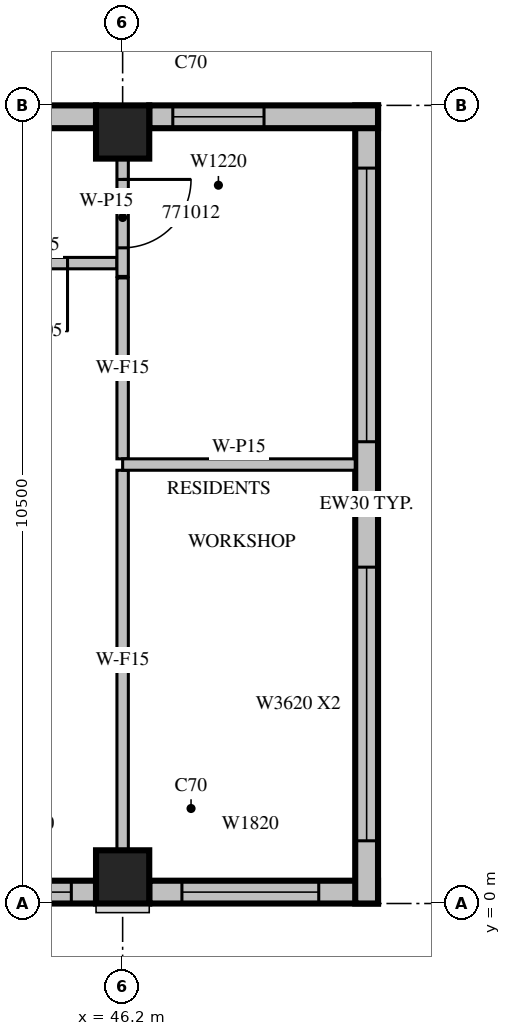
"""IFC4 building model, lengths in metres.
Left out: names, types, materials, properties, quantities, classifications, styles, units other than length and angle.
Written with IfcOpenShell. Run it as: python <this file> out.ifc"""

import sys

from ifc_helpers import new_model, si_unit, direction, frame, frame_2d, origin, origin_2d, place, context, subcontext, project, spatial, rectangle, extrude, source, transform, mapped, element, fill, save


model = new_model("IFC4")
c1 = context("Model", 3, precision=1e-05, world=origin(), true_north=direction((0.0, 1.0)))
c2 = subcontext(c1, "Body", "Model", "MODEL_VIEW")
j1 = project(units=[si_unit("LENGTHUNIT", "METRE"), si_unit("PLANEANGLEUNIT", "RADIAN")], contexts=[c1])
p1 = place(None, origin())
s1 = spatial("IfcSite", under=j1, at=p1, CompositionType="ELEMENT")
p2 = place(p1, origin())
s2 = spatial("IfcBuilding", under=s1, at=p2, CompositionType="ELEMENT")
p3 = place(p2, frame((0.0, 0.0, 309.0)))
s3 = spatial("IfcBuildingStorey", under=s2, at=p3, CompositionType="ELEMENT", Elevation=309.0)
m1 = source(origin(), c2, "Body", "SweptSolid", [
    extrude(rectangle(XDim=0.7, YDim=0.7, at=origin_2d()), origin(), (0.0, 0.0, 1.0), 3.5),
])
for number, where, z_axis, x_axis in (
    (1, (46.2, 0.35, 0.0), (0.0, 0.0, 1.0), (1.0, 0.0, 0.0)),
    (2, (46.2, 10.15, 0.0), (0.0, 0.0, 1.0), (1.0, 0.0, 0.0)),
):
    element("IfcColumn", number, at=place(p3, frame(where, z_axis=z_axis, x_axis=x_axis)), inside=s3, PredefinedType="COLUMN", context=c2, shape_type="MappedRepresentation", body=[
        mapped(m1, transform((0.0, 0.0, 0.0), scale=1.0)),
    ])
m2 = source(origin(), c2, "Body", "SweptSolid", [
    extrude(rectangle(XDim=1.85, YDim=0.3, at=frame_2d((0.925, 0.0))), origin(), (0.0, 0.0, 1.0), 3.1),
])
p4 = place(p3, frame((44.0, 0.15, 0.0), z_axis=(0.0, 0.0, 1.0), x_axis=(1.0, 0.0, 0.0)))
e3 = element("IfcWall", 3, at=p4, inside=s3, PredefinedType="STANDARD", context=c2, shape_type="MappedRepresentation", body=[
    mapped(m2, transform((0.0, 0.0, 0.0), scale=1.0)),
])
m3 = source(origin(), c2, "Body", "SweptSolid", [
    extrude(rectangle(XDim=1.2, YDim=2.0, at=frame_2d((0.6, 1.0))), frame((0.0, 0.16, 0.0), z_axis=(0.0, -1.0, 0.0), x_axis=(1.0, 0.0, 0.0)), (0.0, 0.0, 1.0), 0.32),
])
p5 = place(p4, frame((0.325, 0.0, 0.6)))
e4 = element("IfcOpeningElement", 4, at=p5, cuts=e3, PredefinedType="OPENING", context=c2, shape_type="MappedRepresentation", body=[
    mapped(m3, transform((0.0, 0.0, 0.0), scale=1.0)),
])
m4 = source(origin(), c2, "Body", "SweptSolid", [
    extrude(rectangle(XDim=3.01, YDim=0.3, at=frame_2d((1.505, 0.0))), origin(), (0.0, 0.0, 1.0), 3.1),
])
p6 = place(p3, frame((46.55, 0.15, 0.0), z_axis=(0.0, 0.0, 1.0), x_axis=(1.0, 0.0, 0.0)))
e5 = element("IfcWall", 5, at=p6, inside=s3, PredefinedType="STANDARD", context=c2, shape_type="MappedRepresentation", body=[
    mapped(m4, transform((0.0, 0.0, 0.0), scale=1.0)),
])
m5 = source(origin(), c2, "Body", "SweptSolid", [
    extrude(rectangle(XDim=1.8, YDim=2.0, at=frame_2d((0.9, 1.0))), frame((0.0, 0.16, 0.0), z_axis=(0.0, -1.0, 0.0), x_axis=(1.0, 0.0, 0.0)), (0.0, 0.0, 1.0), 0.32),
])
p7 = place(p6, frame((0.43, 0.0, 0.6)))
e6 = element("IfcOpeningElement", 6, at=p7, cuts=e5, PredefinedType="OPENING", context=c2, shape_type="MappedRepresentation", body=[
    mapped(m5, transform((0.0, 0.0, 0.0), scale=1.0)),
])
m6 = source(origin(), c2, "Body", "SweptSolid", [
    extrude(rectangle(XDim=10.5, YDim=0.3, at=frame_2d((5.25, 0.0))), origin(), (0.0, 0.0, 1.0), 3.1),
])
p8 = place(p3, frame((49.41, 0.0, 0.0), z_axis=(0.0, 0.0, 1.0), x_axis=(0.0, 1.0, 0.0)))
e7 = element("IfcWall", 7, at=p8, inside=s3, PredefinedType="STANDARD", context=c2, shape_type="MappedRepresentation", body=[
    mapped(m6, transform((0.0, 0.0, 0.0), scale=1.0)),
])
m7 = source(origin(), c2, "Body", "SweptSolid", [
    extrude(rectangle(XDim=3.6, YDim=2.0, at=frame_2d((1.8, 1.0))), frame((0.0, 0.16, 0.0), z_axis=(0.0, -1.0, 0.0), x_axis=(1.0, 0.0, 0.0)), (0.0, 0.0, 1.0), 0.32),
])
p9 = place(p8, frame((0.825, 0.0, 0.6)))
e8 = element("IfcOpeningElement", 8, at=p9, cuts=e7, PredefinedType="OPENING", context=c2, shape_type="MappedRepresentation", body=[
    mapped(m7, transform((0.0, 0.0, 0.0), scale=1.0)),
])
p10 = place(p8, frame((6.075, 0.0, 0.6)))
e9 = element("IfcOpeningElement", 9, at=p10, cuts=e7, PredefinedType="OPENING", context=c2, shape_type="MappedRepresentation", body=[
    mapped(m7, transform((0.0, 0.0, 0.0), scale=1.0)),
])
p11 = place(p3, frame((49.56, 10.35, 0.0), z_axis=(0.0, 0.0, 1.0), x_axis=(-1.0, 0.0, 0.0)))
e10 = element("IfcWall", 10, at=p11, inside=s3, PredefinedType="STANDARD", context=c2, shape_type="MappedRepresentation", body=[
    mapped(m4, transform((0.0, 0.0, 0.0), scale=1.0)),
])
p12 = place(p11, frame((1.5, 0.0, 0.6)))
e11 = element("IfcOpeningElement", 11, at=p12, cuts=e10, PredefinedType="OPENING", context=c2, shape_type="MappedRepresentation", body=[
    mapped(m3, transform((0.0, 0.0, 0.0), scale=1.0)),
])
m8 = source(origin(), c2, "Body", "SweptSolid", [
    extrude(rectangle(XDim=7.7, YDim=0.3, at=frame_2d((3.85, 0.0))), origin(), (0.0, 0.0, 1.0), 3.1),
])
p13 = place(p3, frame((45.85, 10.35, 0.0), z_axis=(0.0, 0.0, 1.0), x_axis=(-1.0, 0.0, 0.0)))
e12 = element("IfcWall", 12, at=p13, inside=s3, PredefinedType="STANDARD", context=c2, shape_type="MappedRepresentation", body=[
    mapped(m8, transform((0.0, 0.0, 0.0), scale=1.0)),
])
m9 = source(origin(), c2, "Body", "SweptSolid", [
    extrude(rectangle(XDim=3.0, YDim=2.0, at=frame_2d((1.5, 1.0))), frame((0.0, 0.16, 0.0), z_axis=(0.0, -1.0, 0.0), x_axis=(1.0, 0.0, 0.0)), (0.0, 0.0, 1.0), 0.32),
])
p14 = place(p13, frame((1.09, 0.0, 0.6)))
e13 = element("IfcOpeningElement", 13, at=p14, cuts=e12, PredefinedType="OPENING", context=c2, shape_type="MappedRepresentation", body=[
    mapped(m9, transform((0.0, 0.0, 0.0), scale=1.0)),
])
p15 = place(p13, frame((6.19, 0.0, 0.6)))
e14 = element("IfcOpeningElement", 14, at=p15, cuts=e12, PredefinedType="OPENING", context=c2, shape_type="MappedRepresentation", body=[
    mapped(m3, transform((0.0, 0.0, 0.0), scale=1.0)),
])
m10 = source(origin(), c2, "Body", "SweptSolid", [
    extrude(rectangle(XDim=2.2, YDim=0.15, at=frame_2d((1.1, 0.0))), origin(), (0.0, 0.0, 1.0), 3.1),
])
p16 = place(p3, frame((46.125, 8.425, 0.0), z_axis=(0.0, 0.0, 1.0), x_axis=(-1.0, 0.0, 0.0)))
e15 = element("IfcWall", 15, at=p16, inside=s3, PredefinedType="PARTITIONING", context=c2, shape_type="MappedRepresentation", body=[
    mapped(m10, transform((0.0, 0.0, 0.0), scale=1.0)),
])
m11 = source(origin(), c2, "Body", "SweptSolid", [
    extrude(rectangle(XDim=0.9, YDim=2.1, at=frame_2d((0.45, 1.05))), frame((0.0, 0.085, 0.0), z_axis=(0.0, -1.0, 0.0), x_axis=(1.0, 0.0, 0.0)), (0.0, 0.0, 1.0), 0.17),
])
p17 = place(p16, frame((0.65, 0.0, 0.0)))
e16 = element("IfcOpeningElement", 16, at=p17, cuts=e15, PredefinedType="OPENING", context=c2, shape_type="MappedRepresentation", body=[
    mapped(m11, transform((0.0, 0.0, 0.0), scale=1.0)),
])
m12 = source(origin(), c2, "Body", "SweptSolid", [
    extrude(rectangle(XDim=1.551, YDim=0.15, at=frame_2d((0.775, 0.0))), origin(), (0.0, 0.0, 1.0), 3.1),
])
p18 = place(p3, frame((46.2, 9.801, 0.0), z_axis=(0.0, 0.0, 1.0), x_axis=(0.0, -1.0, 0.0)))
e17 = element("IfcWall", 17, at=p18, inside=s3, PredefinedType="PARTITIONING", context=c2, shape_type="MappedRepresentation", body=[
    mapped(m12, transform((0.0, 0.0, 0.0), scale=1.0)),
])
p19 = place(p18, frame((0.275, 0.0, 0.0)))
e18 = element("IfcOpeningElement", 18, at=p19, cuts=e17, PredefinedType="OPENING", context=c2, shape_type="MappedRepresentation", body=[
    mapped(m11, transform((0.0, 0.0, 0.0), scale=1.0)),
])
m13 = source(origin(), c2, "Body", "SweptSolid", [
    extrude(rectangle(XDim=5.001, YDim=0.15, at=frame_2d((2.501, 0.0))), origin(), (0.0, 0.0, 1.0), 3.1),
])
p20 = place(p3, frame((46.2, 0.699, 0.0), z_axis=(0.0, 0.0, 1.0), x_axis=(0.0, 1.0, 0.0)))
e19 = element("IfcWall", 19, at=p20, inside=s3, PredefinedType="PARTITIONING", context=c2, shape_type="MappedRepresentation", body=[
    mapped(m13, transform((0.0, 0.0, 0.0), scale=1.0)),
])
m14 = source(origin(), c2, "Body", "SweptSolid", [
    extrude(rectangle(XDim=2.38, YDim=0.15, at=frame_2d((1.19, 0.0))), origin(), (0.0, 0.0, 1.0), 3.1),
])
p21 = place(p3, frame((46.2, 5.85, 0.0), z_axis=(0.0, 0.0, 1.0), x_axis=(0.0, 1.0, 0.0)))
e20 = element("IfcWall", 20, at=p21, inside=s3, PredefinedType="PARTITIONING", context=c2, shape_type="MappedRepresentation", body=[
    mapped(m14, transform((0.0, 0.0, 0.0), scale=1.0)),
])
m15 = source(origin(), c2, "Body", "SweptSolid", [
    extrude(rectangle(XDim=3.06, YDim=0.15, at=frame_2d((1.53, 0.0))), origin(), (0.0, 0.0, 1.0), 3.1),
])
p22 = place(p3, frame((49.26, 5.775, 0.0), z_axis=(0.0, 0.0, 1.0), x_axis=(-1.0, 0.0, 0.0)))
e21 = element("IfcWall", 21, at=p22, inside=s3, PredefinedType="PARTITIONING", context=c2, shape_type="MappedRepresentation", body=[
    mapped(m15, transform((0.0, 0.0, 0.0), scale=1.0)),
])
m16 = source(origin(), c2, "Body", "SweptSolid", [
    extrude(rectangle(XDim=1.2, YDim=2.0, at=frame_2d((0.6, 1.0))), frame((0.0, 0.03, 0.0), z_axis=(0.0, -1.0, 0.0), x_axis=(1.0, 0.0, 0.0)), (0.0, 0.0, 1.0), 0.06),
])
p23 = place(p5, origin())
e22 = element("IfcWindow", 22, at=p23, inside=s3, PartitioningType="SINGLE_PANEL", PredefinedType="WINDOW", context=c2, shape_type="MappedRepresentation", body=[
    mapped(m16, transform((0.0, 0.0, 0.0), scale=1.0)),
])
fill(e4, e22)
m17 = source(origin(), c2, "Body", "SweptSolid", [
    extrude(rectangle(XDim=1.8, YDim=2.0, at=frame_2d((0.9, 1.0))), frame((0.0, 0.03, 0.0), z_axis=(0.0, -1.0, 0.0), x_axis=(1.0, 0.0, 0.0)), (0.0, 0.0, 1.0), 0.06),
])
p24 = place(p7, origin())
e23 = element("IfcWindow", 23, at=p24, inside=s3, PartitioningType="SINGLE_PANEL", PredefinedType="WINDOW", context=c2, shape_type="MappedRepresentation", body=[
    mapped(m17, transform((0.0, 0.0, 0.0), scale=1.0)),
])
fill(e6, e23)
m18 = source(origin(), c2, "Body", "SweptSolid", [
    extrude(rectangle(XDim=3.6, YDim=2.0, at=frame_2d((1.8, 1.0))), frame((0.0, 0.03, 0.0), z_axis=(0.0, -1.0, 0.0), x_axis=(1.0, 0.0, 0.0)), (0.0, 0.0, 1.0), 0.06),
])
p25 = place(p9, origin())
e24 = element("IfcWindow", 24, at=p25, inside=s3, PartitioningType="SINGLE_PANEL", PredefinedType="WINDOW", context=c2, shape_type="MappedRepresentation", body=[
    mapped(m18, transform((0.0, 0.0, 0.0), scale=1.0)),
])
fill(e8, e24)
p26 = place(p10, origin())
e25 = element("IfcWindow", 25, at=p26, inside=s3, PartitioningType="SINGLE_PANEL", PredefinedType="WINDOW", context=c2, shape_type="MappedRepresentation", body=[
    mapped(m18, transform((0.0, 0.0, 0.0), scale=1.0)),
])
fill(e9, e25)
p27 = place(p12, origin())
e26 = element("IfcWindow", 26, at=p27, inside=s3, PartitioningType="SINGLE_PANEL", PredefinedType="WINDOW", context=c2, shape_type="MappedRepresentation", body=[
    mapped(m16, transform((0.0, 0.0, 0.0), scale=1.0)),
])
fill(e11, e26)
m19 = source(origin(), c2, "Body", "SweptSolid", [
    extrude(rectangle(XDim=0.9, YDim=2.1, at=frame_2d((0.45, 1.05))), frame((0.0, 0.025, 0.0), z_axis=(0.0, -1.0, 0.0), x_axis=(1.0, 0.0, 0.0)), (0.0, 0.0, 1.0), 0.05),
])
p28 = place(p17, origin())
e27 = element("IfcDoor", 27, at=p28, inside=s3, OperationType="SINGLE_SWING_LEFT", PredefinedType="DOOR", context=c2, shape_type="MappedRepresentation", body=[
    mapped(m19, transform((0.0, 0.0, 0.0), scale=1.0)),
])
fill(e16, e27)
p29 = place(p19, origin())
e28 = element("IfcDoor", 28, at=p29, inside=s3, OperationType="SINGLE_SWING_LEFT", PredefinedType="DOOR", context=c2, shape_type="MappedRepresentation", body=[
    mapped(m19, transform((0.0, 0.0, 0.0), scale=1.0)),
])
fill(e18, e28)
save(model, sys.argv[1])
